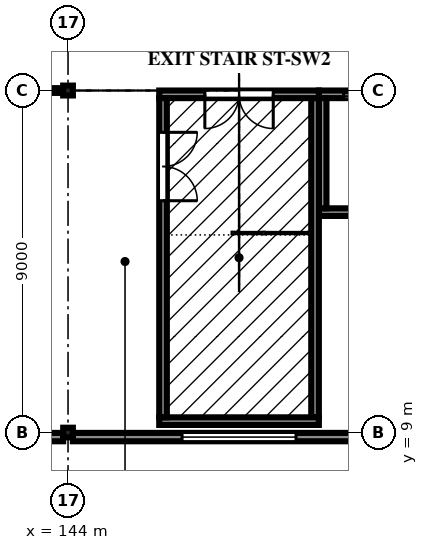
"""IFC4 building model, lengths in metres.
Left out: names, types, materials, properties, quantities, classifications, styles, units other than length and angle.
Written with IfcOpenShell. Run it as: python <this file> out.ifc"""

import sys

from ifc_helpers import new_model, si_unit, direction, frame, frame_2d, origin, origin_2d, place, context, subcontext, project, spatial, polyline, rectangle, i_section, outline, extrude, element, fill, save


model = new_model("IFC4")
c1 = context("Model", 3, precision=1e-05, world=origin(), true_north=direction((0.0, 1.0)))
c2 = subcontext(c1, "Body", "Model", "MODEL_VIEW")
j1 = project(units=[si_unit("LENGTHUNIT", "METRE"), si_unit("PLANEANGLEUNIT", "RADIAN")], contexts=[c1])
p1 = place(None, origin())
s1 = spatial("IfcSite", under=j1, at=p1, CompositionType="ELEMENT")
p2 = place(p1, origin())
s2 = spatial("IfcBuilding", under=s1, at=p2, CompositionType="ELEMENT")
p3 = place(p2, frame((0.0, 0.0, 7.5)))
s3 = spatial("IfcBuildingStorey", under=s2, at=p3, CompositionType="ELEMENT", Elevation=7.5)
p4 = place(p3, frame((144.0, 9.0, 0.0), z_axis=(0.0, 0.0, 1.0), x_axis=(1.0, 0.0, 0.0)))
e1 = element("IfcColumn", 1, at=p4, inside=s3, PredefinedType="COLUMN", context=c2, shape_type="SweptSolid", body=[
    extrude(i_section(OverallWidth=0.255, OverallDepth=0.254, WebThickness=0.009, FlangeThickness=0.014, FilletRadius=0.013, at=origin_2d()), origin(), (0.0, 0.0, 1.0), 4.2),
])
p5 = place(p3, frame((144.0, 18.0, 0.0), z_axis=(0.0, 0.0, 1.0), x_axis=(1.0, 0.0, 0.0)))
e2 = element("IfcColumn", 2, at=p5, inside=s3, PredefinedType="COLUMN", context=c2, shape_type="SweptSolid", body=[
    extrude(i_section(OverallWidth=0.256, OverallDepth=0.26, WebThickness=0.01, FlangeThickness=0.017, FilletRadius=0.013, at=origin_2d()), origin(), (0.0, 0.0, 1.0), 4.2),
])
p6 = place(p3, frame((135.127, 8.88, -0.13), z_axis=(0.0, 0.0, 1.0), x_axis=(1.0, 0.0, 0.0)))
e3 = element("IfcWall", 3, at=p6, inside=s3, PredefinedType="SOLIDWALL", context=c2, shape_type="SweptSolid", body=[
    extrude(rectangle(XDim=8.746, YDim=0.22, at=frame_2d((4.373, 0.0))), origin(), (0.0, 0.0, 1.0), 3.727),
])
p7 = place(p6, frame((2.873, 0.0, 1.03)))
e4 = element("IfcOpeningElement", 4, at=p7, cuts=e3, PredefinedType="OPENING", context=c2, shape_type="SweptSolid", body=[
    extrude(rectangle(XDim=3.0, YDim=2.1, at=frame_2d((1.5, 1.05))), frame((0.0, 0.12, 0.0), z_axis=(0.0, -1.0, 0.0), x_axis=(1.0, 0.0, 0.0)), (0.0, 0.0, 1.0), 0.24),
])
p8 = place(p3, frame((144.127, 8.88, -0.13), z_axis=(0.0, 0.0, 1.0), x_axis=(1.0, 0.0, 0.0)))
e5 = element("IfcWall", 5, at=p8, inside=s3, PredefinedType="SOLIDWALL", context=c2, shape_type="SweptSolid", body=[
    extrude(rectangle(XDim=8.746, YDim=0.22, at=frame_2d((4.373, 0.0))), origin(), (0.0, 0.0, 1.0), 3.727),
])
p9 = place(p8, frame((2.873, 0.0, 1.03)))
e6 = element("IfcOpeningElement", 6, at=p9, cuts=e5, PredefinedType="OPENING", context=c2, shape_type="SweptSolid", body=[
    extrude(rectangle(XDim=3.0, YDim=2.1, at=frame_2d((1.5, 1.05))), frame((0.0, 0.12, 0.0), z_axis=(0.0, -1.0, 0.0), x_axis=(1.0, 0.0, 0.0)), (0.0, 0.0, 1.0), 0.24),
])
p10 = place(p3, frame((146.4, 9.3, 0.0), z_axis=(0.0, 0.0, 1.0), x_axis=(1.0, 0.0, 0.0)))
e7 = element("IfcWall", 7, at=p10, inside=s3, PredefinedType="SOLIDWALL", context=c2, shape_type="SweptSolid", body=[
    extrude(rectangle(XDim=4.2, YDim=0.2, at=frame_2d((2.1, 0.0))), origin(), (0.0, 0.0, 1.0), 3.59),
])
p11 = place(p3, frame((146.4, 17.9, -0.13), z_axis=(0.0, 0.0, 1.0), x_axis=(1.0, 0.0, 0.0)))
e8 = element("IfcWall", 8, at=p11, inside=s3, PredefinedType="SOLIDWALL", context=c2, shape_type="SweptSolid", body=[
    extrude(rectangle(XDim=4.2, YDim=0.2, at=frame_2d((2.1, 0.0))), origin(), (0.0, 0.0, 1.0), 3.72),
])
p12 = place(p11, frame((1.2, 0.0, 0.13)))
e9 = element("IfcOpeningElement", 9, at=p12, cuts=e8, PredefinedType="OPENING", context=c2, shape_type="SweptSolid", body=[
    extrude(rectangle(XDim=1.8, YDim=2.1, at=frame_2d((0.9, 1.05))), frame((0.0, 0.11, 0.0), z_axis=(0.0, -1.0, 0.0), x_axis=(1.0, 0.0, 0.0)), (0.0, 0.0, 1.0), 0.22),
])
p13 = place(p3, frame((146.5, 9.4, -0.13), z_axis=(0.0, 0.0, 1.0), x_axis=(0.0, 1.0, 0.0)))
e10 = element("IfcWall", 10, at=p13, inside=s3, PredefinedType="SOLIDWALL", context=c2, shape_type="SweptSolid", body=[
    extrude(rectangle(XDim=8.4, YDim=0.2, at=frame_2d((4.2, 0.0))), origin(), (0.0, 0.0, 1.0), 3.72),
])
p14 = place(p13, frame((5.7, 0.0, 0.13)))
e11 = element("IfcOpeningElement", 11, at=p14, cuts=e10, PredefinedType="OPENING", context=c2, shape_type="SweptSolid", body=[
    extrude(rectangle(XDim=1.8, YDim=2.1, at=frame_2d((0.9, 1.05))), frame((0.0, 0.11, 0.0), z_axis=(0.0, -1.0, 0.0), x_axis=(1.0, 0.0, 0.0)), (0.0, 0.0, 1.0), 0.22),
])
p15 = place(p3, frame((150.5, 9.4, -0.13), z_axis=(0.0, 0.0, 1.0), x_axis=(0.0, 1.0, 0.0)))
e12 = element("IfcWall", 12, at=p15, inside=s3, PredefinedType="SOLIDWALL", context=c2, shape_type="SweptSolid", body=[
    extrude(rectangle(XDim=8.4, YDim=0.2, at=frame_2d((4.2, 0.0))), origin(), (0.0, 0.0, 1.0), 3.72),
])
p16 = place(p3, frame((150.602, 14.8, 0.0), z_axis=(0.0, 0.0, 1.0), x_axis=(1.0, 0.0, 0.0)))
e13 = element("IfcWall", 13, at=p16, inside=s3, PredefinedType="SOLIDWALL", context=c2, shape_type="SweptSolid", body=[
    extrude(rectangle(XDim=2.286, YDim=0.2, at=frame_2d((1.143, 0.0))), origin(), (0.0, 0.0, 1.0), 3.516),
])
p17 = place(p3, frame((150.602, 17.9, 0.0), z_axis=(0.0, 0.0, 1.0), x_axis=(1.0, 0.0, 0.0)))
e14 = element("IfcWall", 14, at=p17, inside=s3, PredefinedType="SOLIDWALL", context=c2, shape_type="SweptSolid", body=[
    extrude(rectangle(XDim=2.398, YDim=0.2, at=frame_2d((1.199, 0.0))), origin(), (0.0, 0.0, 1.0), 3.516),
])
p18 = place(p17, frame((0.648, 0.0, 0.0)))
e15 = element("IfcOpeningElement", 15, at=p18, cuts=e14, PredefinedType="OPENING", context=c2, shape_type="SweptSolid", body=[
    extrude(rectangle(XDim=1.1, YDim=2.1, at=frame_2d((0.55, 1.05))), frame((0.0, 0.11, 0.0), z_axis=(0.0, -1.0, 0.0), x_axis=(1.0, 0.0, 0.0)), (0.0, 0.0, 1.0), 0.22),
])
p19 = place(p3, frame((150.7, 14.9, 0.0), z_axis=(0.0, 0.0, 1.0), x_axis=(0.0, 1.0, 0.0)))
e16 = element("IfcWall", 16, at=p19, inside=s3, PredefinedType="SOLIDWALL", context=c2, shape_type="SweptSolid", body=[
    extrude(rectangle(XDim=2.9, YDim=0.2, at=frame_2d((1.45, 0.0))), origin(), (0.0, 0.0, 1.0), 3.516),
])
p20 = place(p3, frame((143.872, 18.0, 0.0), z_axis=(0.0, 0.0, 1.0), x_axis=(-1.0, 0.0, 0.0)))
e17 = element("IfcWall", 17, at=p20, inside=s3, PredefinedType="PARTITIONING", context=c2, shape_type="SweptSolid", body=[
    extrude(rectangle(XDim=8.744, YDim=0.125, at=frame_2d((4.372, 0.0))), origin(), (0.0, 0.0, 1.0), 3.307),
])
p21 = place(p9, origin())
e18 = element("IfcWindow", 18, at=p21, inside=s3, PartitioningType="TRIPLE_PANEL_VERTICAL", PredefinedType="WINDOW", context=c2, shape_type="SweptSolid", body=[
    extrude(outline(polyline([(0.0, 0.0), (3.0, 0.0), (3.0, 2.1), (0.0, 2.1), (0.0, 0.0)]), holes=[polyline([(0.07, 0.07), (2.93, 0.07), (2.93, 2.03), (0.07, 2.03), (0.07, 0.07)])]), frame((0.0, 0.03, 0.0), z_axis=(0.0, -1.0, 0.0), x_axis=(1.0, 0.0, 0.0)), (0.0, 0.0, 1.0), 0.06),
    extrude(rectangle(XDim=0.04, YDim=1.96, at=frame_2d((1.017, 1.05))), frame((0.0, 0.022, 0.0), z_axis=(0.0, -1.0, 0.0), x_axis=(1.0, 0.0, 0.0)), (0.0, 0.0, 1.0), 0.044),
    extrude(rectangle(XDim=0.04, YDim=1.96, at=frame_2d((1.983, 1.05))), frame((0.0, 0.022, 0.0), z_axis=(0.0, -1.0, 0.0), x_axis=(1.0, 0.0, 0.0)), (0.0, 0.0, 1.0), 0.044),
    extrude(outline(polyline([(0.07, 0.07), (0.997, 0.07), (0.997, 2.03), (0.07, 2.03), (0.07, 0.07)]), holes=[polyline([(0.1, 0.1), (0.967, 0.1), (0.967, 2.0), (0.1, 2.0), (0.1, 0.1)])]), frame((0.0, 0.022, 0.0), z_axis=(0.0, -1.0, 0.0), x_axis=(1.0, 0.0, 0.0)), (0.0, 0.0, 1.0), 0.045),
    extrude(rectangle(XDim=0.866, YDim=1.9, at=frame_2d((0.533, 1.05))), frame((0.0, 0.006, 0.0), z_axis=(0.0, -1.0, 0.0), x_axis=(1.0, 0.0, 0.0)), (0.0, 0.0, 1.0), 0.012),
    extrude(outline(polyline([(1.037, 0.07), (1.963, 0.07), (1.963, 2.03), (1.037, 2.03), (1.037, 0.07)]), holes=[polyline([(1.067, 0.1), (1.933, 0.1), (1.933, 2.0), (1.067, 2.0), (1.067, 0.1)])]), frame((0.0, 0.022, 0.0), z_axis=(0.0, -1.0, 0.0), x_axis=(1.0, 0.0, 0.0)), (0.0, 0.0, 1.0), 0.045),
    extrude(rectangle(XDim=0.867, YDim=1.9, at=frame_2d((1.5, 1.05))), frame((0.0, 0.006, 0.0), z_axis=(0.0, -1.0, 0.0), x_axis=(1.0, 0.0, 0.0)), (0.0, 0.0, 1.0), 0.012),
    extrude(outline(polyline([(2.003, 0.07), (2.93, 0.07), (2.93, 2.03), (2.003, 2.03), (2.003, 0.07)]), holes=[polyline([(2.033, 0.1), (2.9, 0.1), (2.9, 2.0), (2.033, 2.0), (2.033, 0.1)])]), frame((0.0, 0.022, 0.0), z_axis=(0.0, -1.0, 0.0), x_axis=(1.0, 0.0, 0.0)), (0.0, 0.0, 1.0), 0.045),
    extrude(rectangle(XDim=0.866, YDim=1.9, at=frame_2d((2.467, 1.05))), frame((0.0, 0.006, 0.0), z_axis=(0.0, -1.0, 0.0), x_axis=(1.0, 0.0, 0.0)), (0.0, 0.0, 1.0), 0.012),
])
fill(e6, e18)
p22 = place(p18, origin())
e19 = element("IfcDoor", 19, at=p22, inside=s3, OperationType="SLIDING_TO_LEFT", PredefinedType="DOOR", context=c2, shape_type="SweptSolid", body=[
    extrude(outline(polyline([(0.0, 0.0), (0.07, 0.0), (0.07, 2.03), (1.03, 2.03), (1.03, 0.0), (1.1, 0.0), (1.1, 2.1), (0.0, 2.1), (0.0, 0.0)])), frame((0.0, 0.025, 0.0), z_axis=(0.0, -1.0, 0.0), x_axis=(1.0, 0.0, 0.0)), (0.0, 0.0, 1.0), 0.05),
    extrude(rectangle(XDim=0.524, YDim=2.016, at=frame_2d((0.336, 1.018))), frame((0.0, 0.018, 0.0), z_axis=(0.0, -1.0, 0.0), x_axis=(1.0, 0.0, 0.0)), (0.0, 0.0, 1.0), 0.016),
    extrude(rectangle(XDim=0.52, YDim=2.016, at=frame_2d((0.766, 1.018))), frame((0.0, -0.002, 0.0), z_axis=(0.0, -1.0, 0.0), x_axis=(1.0, 0.0, 0.0)), (0.0, 0.0, 1.0), 0.016),
])
fill(e15, e19)
p23 = place(p14, frame((1.8, 0.0, 0.0), z_axis=(0.0, 0.0, 1.0), x_axis=(-1.0, 0.0, 0.0)))
e20 = element("IfcDoor", 20, at=p23, inside=s3, OperationType="DOUBLE_DOOR_SINGLE_SWING", PredefinedType="DOOR", context=c2, shape_type="SweptSolid", body=[
    extrude(outline(polyline([(0.0, 0.0), (0.07, 0.0), (0.07, 2.03), (1.73, 2.03), (1.73, 0.0), (1.8, 0.0), (1.8, 2.1), (0.0, 2.1), (0.0, 0.0)])), frame((0.0, 0.025, 0.0), z_axis=(0.0, -1.0, 0.0), x_axis=(1.0, 0.0, 0.0)), (0.0, 0.0, 1.0), 0.05),
    extrude(outline(polyline([(0.074, 0.01), (0.897, 0.01), (0.897, 2.026), (0.074, 2.026), (0.074, 0.01)]), holes=[polyline([(0.194, 0.16), (0.777, 0.16), (0.777, 1.01), (0.194, 1.01), (0.194, 0.16)]), polyline([(0.335, 1.16), (0.635, 1.16), (0.635, 1.76), (0.335, 1.76), (0.335, 1.16)])]), frame((0.0, 0.017, 0.0), z_axis=(0.0, -1.0, 0.0), x_axis=(1.0, 0.0, 0.0)), (0.0, 0.0, 1.0), 0.035),
    extrude(rectangle(XDim=0.583, YDim=0.85, at=frame_2d((0.485, 0.585))), frame((0.0, 0.009, 0.0), z_axis=(0.0, -1.0, 0.0), x_axis=(1.0, 0.0, 0.0)), (0.0, 0.0, 1.0), 0.017),
    extrude(rectangle(XDim=0.3, YDim=0.6, at=frame_2d((0.485, 1.46))), frame((0.0, 0.006, 0.0), z_axis=(0.0, -1.0, 0.0), x_axis=(1.0, 0.0, 0.0)), (0.0, 0.0, 1.0), 0.012),
    extrude(outline(polyline([(0.903, 0.01), (1.726, 0.01), (1.726, 2.026), (0.903, 2.026), (0.903, 0.01)]), holes=[polyline([(1.023, 0.16), (1.606, 0.16), (1.606, 1.01), (1.023, 1.01), (1.023, 0.16)]), polyline([(1.165, 1.16), (1.465, 1.16), (1.465, 1.76), (1.165, 1.76), (1.165, 1.16)])]), frame((0.0, 0.017, 0.0), z_axis=(0.0, -1.0, 0.0), x_axis=(1.0, 0.0, 0.0)), (0.0, 0.0, 1.0), 0.035),
    extrude(rectangle(XDim=0.583, YDim=0.85, at=frame_2d((1.314, 0.585))), frame((0.0, 0.009, 0.0), z_axis=(0.0, -1.0, 0.0), x_axis=(1.0, 0.0, 0.0)), (0.0, 0.0, 1.0), 0.017),
    extrude(rectangle(XDim=0.3, YDim=0.6, at=frame_2d((1.314, 1.46))), frame((0.0, 0.006, 0.0), z_axis=(0.0, -1.0, 0.0), x_axis=(1.0, 0.0, 0.0)), (0.0, 0.0, 1.0), 0.012),
])
fill(e11, e20)
p24 = place(p12, frame((1.8, 0.0, 0.0), z_axis=(0.0, 0.0, 1.0), x_axis=(-1.0, 0.0, 0.0)))
e21 = element("IfcDoor", 21, at=p24, inside=s3, OperationType="DOUBLE_DOOR_SINGLE_SWING", PredefinedType="DOOR", context=c2, shape_type="SweptSolid", body=[
    extrude(outline(polyline([(0.0, 0.0), (0.07, 0.0), (0.07, 2.03), (1.73, 2.03), (1.73, 0.0), (1.8, 0.0), (1.8, 2.1), (0.0, 2.1), (0.0, 0.0)])), frame((0.0, 0.025, 0.0), z_axis=(0.0, -1.0, 0.0), x_axis=(1.0, 0.0, 0.0)), (0.0, 0.0, 1.0), 0.05),
    extrude(outline(polyline([(0.074, 0.01), (0.897, 0.01), (0.897, 2.026), (0.074, 2.026), (0.074, 0.01)]), holes=[polyline([(0.194, 0.16), (0.777, 0.16), (0.777, 1.01), (0.194, 1.01), (0.194, 0.16)]), polyline([(0.335, 1.16), (0.635, 1.16), (0.635, 1.76), (0.335, 1.76), (0.335, 1.16)])]), frame((0.0, 0.017, 0.0), z_axis=(0.0, -1.0, 0.0), x_axis=(1.0, 0.0, 0.0)), (0.0, 0.0, 1.0), 0.035),
    extrude(rectangle(XDim=0.583, YDim=0.85, at=frame_2d((0.485, 0.585))), frame((0.0, 0.009, 0.0), z_axis=(0.0, -1.0, 0.0), x_axis=(1.0, 0.0, 0.0)), (0.0, 0.0, 1.0), 0.017),
    extrude(rectangle(XDim=0.3, YDim=0.6, at=frame_2d((0.485, 1.46))), frame((0.0, 0.006, 0.0), z_axis=(0.0, -1.0, 0.0), x_axis=(1.0, 0.0, 0.0)), (0.0, 0.0, 1.0), 0.012),
    extrude(outline(polyline([(0.903, 0.01), (1.726, 0.01), (1.726, 2.026), (0.903, 2.026), (0.903, 0.01)]), holes=[polyline([(1.023, 0.16), (1.606, 0.16), (1.606, 1.01), (1.023, 1.01), (1.023, 0.16)]), polyline([(1.165, 1.16), (1.465, 1.16), (1.465, 1.76), (1.165, 1.76), (1.165, 1.16)])]), frame((0.0, 0.017, 0.0), z_axis=(0.0, -1.0, 0.0), x_axis=(1.0, 0.0, 0.0)), (0.0, 0.0, 1.0), 0.035),
    extrude(rectangle(XDim=0.583, YDim=0.85, at=frame_2d((1.314, 0.585))), frame((0.0, 0.009, 0.0), z_axis=(0.0, -1.0, 0.0), x_axis=(1.0, 0.0, 0.0)), (0.0, 0.0, 1.0), 0.017),
    extrude(rectangle(XDim=0.3, YDim=0.6, at=frame_2d((1.314, 1.46))), frame((0.0, 0.006, 0.0), z_axis=(0.0, -1.0, 0.0), x_axis=(1.0, 0.0, 0.0)), (0.0, 0.0, 1.0), 0.012),
])
fill(e9, e21)
save(model, sys.argv[1])
